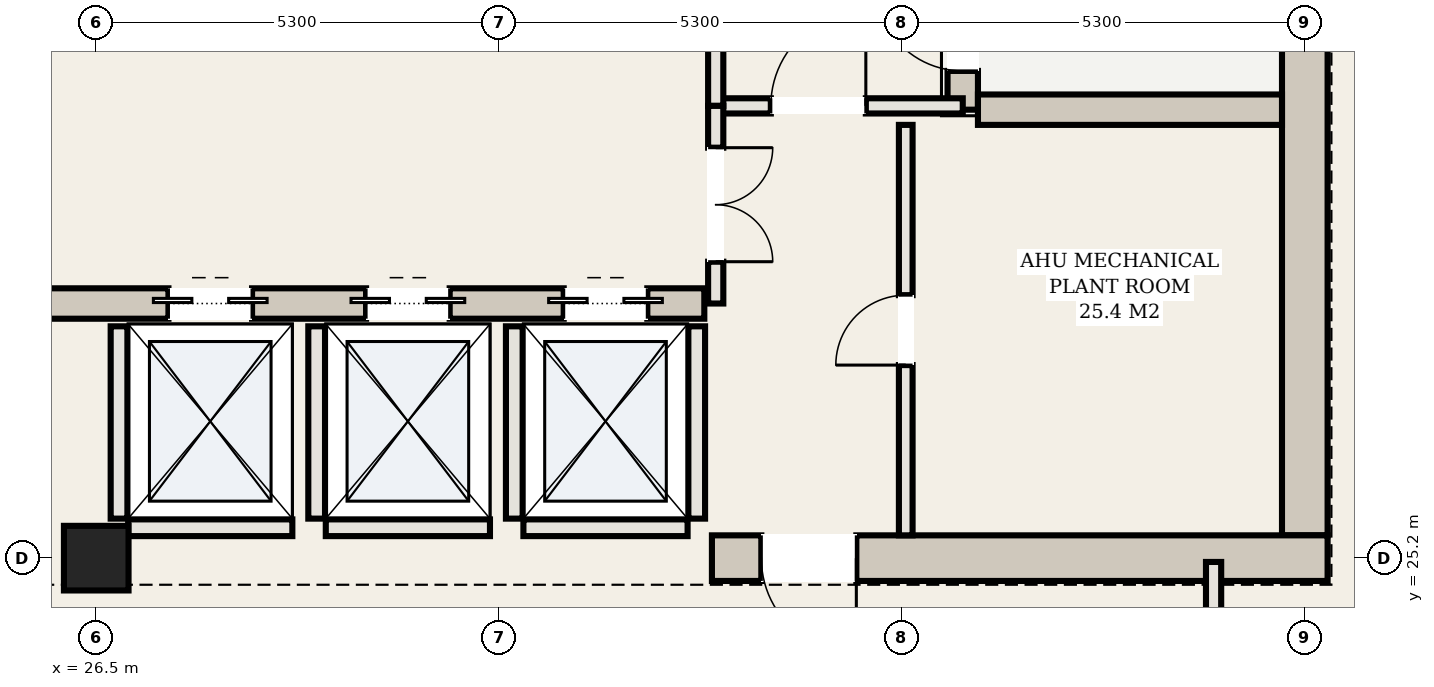
"""IFC4 building model, lengths in metres.
Left out: names, types, materials, properties, quantities, classifications, styles, units other than length and angle.
Written with IfcOpenShell. Run it as: python <this file> out.ifc"""

import sys

from ifc_helpers import new_model, si_unit, direction, frame, frame_2d, origin, origin_2d, place, context, subcontext, project, spatial, rectangle, hollow_rectangle, extrude, element, fill, save


model = new_model("IFC4")
c1 = context("Model", 3, precision=1e-05, world=origin(), true_north=direction((0.0, 1.0)))
c2 = subcontext(c1, "Body", "Model", "MODEL_VIEW")
j1 = project(units=[si_unit("LENGTHUNIT", "METRE"), si_unit("PLANEANGLEUNIT", "RADIAN")], contexts=[c1])
p1 = place(None, origin())
s1 = spatial("IfcSite", under=j1, at=p1, CompositionType="ELEMENT")
p2 = place(p1, origin())
s2 = spatial("IfcBuilding", under=s1, at=p2, CompositionType="ELEMENT")
p3 = place(p2, frame((0.0, 0.0, 185.4)))
s3 = spatial("IfcBuildingStorey", under=s2, at=p3, CompositionType="ELEMENT", Elevation=185.4)
p4 = place(p3, frame((42.4, 25.5, 0.0), z_axis=(0.0, 0.0, 1.0), x_axis=(0.0, 1.0, 0.0)))
e1 = element("IfcWall", 1, at=p4, inside=s3, PredefinedType="SHEAR", context=c2, shape_type="SweptSolid", body=[
    extrude(rectangle(XDim=14.2, YDim=0.6, at=frame_2d((7.1, 0.0))), origin(), (0.0, 0.0, 1.0), 6.56),
])
p5 = place(p3, frame((34.6, 25.2, 0.0), z_axis=(0.0, 0.0, 1.0), x_axis=(1.0, 0.0, 0.0)))
e2 = element("IfcWall", 2, at=p5, inside=s3, PredefinedType="SHEAR", context=c2, shape_type="SweptSolid", body=[
    extrude(rectangle(XDim=8.1, YDim=0.6, at=frame_2d((4.05, 0.0))), origin(), (0.0, 0.0, 1.0), 6.56),
])
p6 = place(p5, frame((0.65, 0.0, 0.0)))
e3 = element("IfcOpeningElement", 3, at=p6, cuts=e2, PredefinedType="OPENING", context=c2, shape_type="SweptSolid", body=[
    extrude(rectangle(XDim=1.25, YDim=2.2, at=frame_2d((0.625, 1.1))), frame((0.0, 0.31, 0.0), z_axis=(0.0, -1.0, 0.0), x_axis=(1.0, 0.0, 0.0)), (0.0, 0.0, 1.0), 0.62),
])
p7 = place(p3, frame((37.9, 31.1, 0.0), z_axis=(0.0, 0.0, 1.0), x_axis=(0.0, 1.0, 0.0)))
e4 = element("IfcWall", 4, at=p7, inside=s3, PredefinedType="SHEAR", context=c2, shape_type="SweptSolid", body=[
    extrude(rectangle(XDim=8.6, YDim=0.4, at=frame_2d((4.3, 0.0))), origin(), (0.0, 0.0, 1.0), 6.56),
])
p8 = place(p7, frame((0.51, 0.0, 0.0)))
e5 = element("IfcOpeningElement", 5, at=p8, cuts=e4, PredefinedType="OPENING", context=c2, shape_type="SweptSolid", body=[
    extrude(rectangle(XDim=1.15, YDim=2.2, at=frame_2d((0.575, 1.1))), frame((0.0, 0.21, 0.0), z_axis=(0.0, -1.0, 0.0), x_axis=(1.0, 0.0, 0.0)), (0.0, 0.0, 1.0), 0.42),
])
p9 = place(p3, frame((38.1, 31.1, 0.0), z_axis=(0.0, 0.0, 1.0), x_axis=(1.0, 0.0, 0.0)))
e6 = element("IfcWall", 6, at=p9, inside=s3, PredefinedType="SHEAR", context=c2, shape_type="SweptSolid", body=[
    extrude(rectangle(XDim=4.0, YDim=0.4, at=frame_2d((2.0, 0.0))), origin(), (0.0, 0.0, 1.0), 6.56),
])
p10 = place(p3, frame((18.5, 28.55, 0.0), z_axis=(0.0, 0.0, 1.0), x_axis=(1.0, 0.0, 0.0)))
e7 = element("IfcWall", 7, at=p10, inside=s3, PredefinedType="SHEAR", context=c2, shape_type="SweptSolid", body=[
    extrude(rectangle(XDim=16.0, YDim=0.4, at=frame_2d((8.0, 0.0))), origin(), (0.0, 0.0, 1.0), 6.56),
])
p11 = place(p10, frame((8.95, 0.0, 0.0)))
e8 = element("IfcOpeningElement", 8, at=p11, cuts=e7, PredefinedType="OPENING", context=c2, shape_type="SweptSolid", body=[
    extrude(rectangle(XDim=1.1, YDim=2.15, at=frame_2d((0.55, 1.075))), frame((0.0, 0.21, 0.0), z_axis=(0.0, -1.0, 0.0), x_axis=(1.0, 0.0, 0.0)), (0.0, 0.0, 1.0), 0.42),
])
p12 = place(p10, frame((11.55, 0.0, 0.0)))
e9 = element("IfcOpeningElement", 9, at=p12, cuts=e7, PredefinedType="OPENING", context=c2, shape_type="SweptSolid", body=[
    extrude(rectangle(XDim=1.1, YDim=2.15, at=frame_2d((0.55, 1.075))), frame((0.0, 0.21, 0.0), z_axis=(0.0, -1.0, 0.0), x_axis=(1.0, 0.0, 0.0)), (0.0, 0.0, 1.0), 0.42),
])
p13 = place(p10, frame((14.15, 0.0, 0.0)))
e10 = element("IfcOpeningElement", 10, at=p13, cuts=e7, PredefinedType="OPENING", context=c2, shape_type="SweptSolid", body=[
    extrude(rectangle(XDim=1.1, YDim=2.15, at=frame_2d((0.55, 1.075))), frame((0.0, 0.21, 0.0), z_axis=(0.0, -1.0, 0.0), x_axis=(1.0, 0.0, 0.0)), (0.0, 0.0, 1.0), 0.42),
])
p14 = place(p3, frame((26.5, 25.2, 0.0), z_axis=(0.0, 0.0, 1.0), x_axis=(1.0, 0.0, 0.0)))
e11 = element("IfcColumn", 11, at=p14, inside=s3, PredefinedType="COLUMN", context=c2, shape_type="SweptSolid", body=[
    extrude(hollow_rectangle(XDim=0.85, YDim=0.85, WallThickness=0.028, at=origin_2d()), origin(), (0.0, 0.0, 1.0), 6.8),
])
p15 = place(p3, frame((26.8, 25.72, 0.0), z_axis=(0.0, 0.0, 1.0), x_axis=(0.0, 1.0, 0.0)))
e12 = element("IfcWall", 12, at=p15, inside=s3, PredefinedType="SOLIDWALL", context=c2, shape_type="SweptSolid", body=[
    extrude(rectangle(XDim=2.53, YDim=0.22, at=frame_2d((1.265, 0.0))), origin(), (0.0, 0.0, 1.0), 6.56),
])
p16 = place(p3, frame((26.92, 25.6, 0.0), z_axis=(0.0, 0.0, 1.0), x_axis=(1.0, 0.0, 0.0)))
e13 = element("IfcWall", 13, at=p16, inside=s3, PredefinedType="SOLIDWALL", context=c2, shape_type="SweptSolid", body=[
    extrude(rectangle(XDim=2.16, YDim=0.22, at=frame_2d((1.08, 0.0))), origin(), (0.0, 0.0, 1.0), 5.755),
])
p17 = place(p3, frame((29.4, 25.72, 0.0), z_axis=(0.0, 0.0, 1.0), x_axis=(0.0, 1.0, 0.0)))
e14 = element("IfcWall", 14, at=p17, inside=s3, PredefinedType="SOLIDWALL", context=c2, shape_type="SweptSolid", body=[
    extrude(rectangle(XDim=2.53, YDim=0.22, at=frame_2d((1.265, 0.0))), origin(), (0.0, 0.0, 1.0), 6.56),
])
p18 = place(p3, frame((29.52, 25.6, 0.0), z_axis=(0.0, 0.0, 1.0), x_axis=(1.0, 0.0, 0.0)))
e15 = element("IfcWall", 15, at=p18, inside=s3, PredefinedType="SOLIDWALL", context=c2, shape_type="SweptSolid", body=[
    extrude(rectangle(XDim=2.16, YDim=0.22, at=frame_2d((1.08, 0.0))), origin(), (0.0, 0.0, 1.0), 5.755),
])
for number, where, z_axis, x_axis in (
    (16, (32.0, 25.72, 0.0), (0.0, 0.0, 1.0), (0.0, 1.0, 0.0)),
    (17, (34.4, 25.72, 0.0), (0.0, 0.0, 1.0), (0.0, 1.0, 0.0)),
):
    element("IfcWall", number, at=place(p3, frame(where, z_axis=z_axis, x_axis=x_axis)), inside=s3, PredefinedType="SOLIDWALL", context=c2, shape_type="SweptSolid", body=[
        extrude(rectangle(XDim=2.53, YDim=0.22, at=frame_2d((1.265, 0.0))), origin(), (0.0, 0.0, 1.0), 6.56),
    ])
p19 = place(p3, frame((32.12, 25.6, 0.0), z_axis=(0.0, 0.0, 1.0), x_axis=(1.0, 0.0, 0.0)))
e18 = element("IfcWall", 18, at=p19, inside=s3, PredefinedType="SOLIDWALL", context=c2, shape_type="SweptSolid", body=[
    extrude(rectangle(XDim=2.16, YDim=0.22, at=frame_2d((1.08, 0.0))), origin(), (0.0, 0.0, 1.0), 5.755),
])
p20 = place(p3, frame((34.65, 31.15, 0.0), z_axis=(0.0, 0.0, 1.0), x_axis=(1.0, 0.0, 0.0)))
e19 = element("IfcWall", 19, at=p20, inside=s3, PredefinedType="PARTITIONING", context=c2, shape_type="SweptSolid", body=[
    extrude(rectangle(XDim=3.25, YDim=0.2, at=frame_2d((1.625, 0.0))), origin(), (0.0, 0.0, 1.0), 6.56),
])
p21 = place(p20, frame((0.725, 0.0, 0.0)))
e20 = element("IfcOpeningElement", 20, at=p21, cuts=e19, PredefinedType="OPENING", context=c2, shape_type="SweptSolid", body=[
    extrude(rectangle(XDim=1.25, YDim=2.2, at=frame_2d((0.625, 1.1))), frame((0.0, 0.11, 0.0), z_axis=(0.0, -1.0, 0.0), x_axis=(1.0, 0.0, 0.0)), (0.0, 0.0, 1.0), 0.22),
])
p22 = place(p3, frame((34.65, 31.15, 0.0), z_axis=(0.0, 0.0, 1.0), x_axis=(0.0, 1.0, 0.0)))
e21 = element("IfcWall", 21, at=p22, inside=s3, PredefinedType="PARTITIONING", context=c2, shape_type="SweptSolid", body=[
    extrude(rectangle(XDim=5.15, YDim=0.2, at=frame_2d((2.575, 0.0))), origin(), (0.0, 0.0, 1.0), 6.56),
])
p23 = place(p22, frame((1.875, 0.0, 0.0)))
e22 = element("IfcOpeningElement", 22, at=p23, cuts=e21, PredefinedType="OPENING", context=c2, shape_type="SweptSolid", body=[
    extrude(rectangle(XDim=1.25, YDim=2.2, at=frame_2d((0.625, 1.1))), frame((0.0, 0.11, 0.0), z_axis=(0.0, -1.0, 0.0), x_axis=(1.0, 0.0, 0.0)), (0.0, 0.0, 1.0), 0.22),
])
p24 = place(p3, frame((37.15, 25.5, 0.0), z_axis=(0.0, 0.0, 1.0), x_axis=(0.0, 1.0, 0.0)))
e23 = element("IfcWall", 23, at=p24, inside=s3, PredefinedType="PARTITIONING", context=c2, shape_type="SweptSolid", body=[
    extrude(rectangle(XDim=5.4, YDim=0.18, at=frame_2d((2.7, 0.0))), origin(), (0.0, 0.0, 1.0), 5.055),
])
p25 = place(p24, frame((2.24, 0.0, 0.0)))
e24 = element("IfcOpeningElement", 24, at=p25, cuts=e23, PredefinedType="OPENING", context=c2, shape_type="SweptSolid", body=[
    extrude(rectangle(XDim=0.92, YDim=2.15, at=frame_2d((0.46, 1.075))), frame((0.0, 0.1, 0.0), z_axis=(0.0, -1.0, 0.0), x_axis=(1.0, 0.0, 0.0)), (0.0, 0.0, 1.0), 0.2),
])
p26 = place(p3, frame((34.65, 28.55, 0.0), z_axis=(0.0, 0.0, 1.0), x_axis=(0.0, 1.0, 0.0)))
e25 = element("IfcWall", 25, at=p26, inside=s3, PredefinedType="PARTITIONING", context=c2, shape_type="SweptSolid", body=[
    extrude(rectangle(XDim=2.6, YDim=0.2, at=frame_2d((1.3, 0.0))), origin(), (0.0, 0.0, 1.0), 6.56),
])
p27 = place(p26, frame((0.55, 0.0, 0.0)))
e26 = element("IfcOpeningElement", 26, at=p27, cuts=e25, PredefinedType="OPENING", context=c2, shape_type="SweptSolid", body=[
    extrude(rectangle(XDim=1.5, YDim=2.25, at=frame_2d((0.75, 1.125))), frame((0.0, 0.11, 0.0), z_axis=(0.0, -1.0, 0.0), x_axis=(1.0, 0.0, 0.0)), (0.0, 0.0, 1.0), 0.22),
])
p28 = place(p3, frame((41.2, 22.4, 0.0), z_axis=(0.0, 0.0, 1.0), x_axis=(0.0, 1.0, 0.0)))
e27 = element("IfcWall", 27, at=p28, inside=s3, PredefinedType="PARTITIONING", context=c2, shape_type="SweptSolid", body=[
    extrude(rectangle(XDim=2.75, YDim=0.2, at=frame_2d((1.375, 0.0))), origin(), (0.0, 0.0, 1.0), 6.56),
])
p29 = place(p11, origin())
e28 = element("IfcDoor", 28, at=p29, inside=s3, OperationType="DOUBLE_DOOR_SLIDING", PredefinedType="DOOR", context=c2, shape_type="SweptSolid", body=[
    extrude(rectangle(XDim=1.1, YDim=2.15, at=frame_2d((0.55, 1.075))), frame((0.0, 0.025, 0.0), z_axis=(0.0, -1.0, 0.0), x_axis=(1.0, 0.0, 0.0)), (0.0, 0.0, 1.0), 0.05),
])
fill(e8, e28)
p30 = place(p12, origin())
e29 = element("IfcDoor", 29, at=p30, inside=s3, OperationType="DOUBLE_DOOR_SLIDING", PredefinedType="DOOR", context=c2, shape_type="SweptSolid", body=[
    extrude(rectangle(XDim=1.1, YDim=2.15, at=frame_2d((0.55, 1.075))), frame((0.0, 0.025, 0.0), z_axis=(0.0, -1.0, 0.0), x_axis=(1.0, 0.0, 0.0)), (0.0, 0.0, 1.0), 0.05),
])
fill(e9, e29)
p31 = place(p13, origin())
e30 = element("IfcDoor", 30, at=p31, inside=s3, OperationType="DOUBLE_DOOR_SLIDING", PredefinedType="DOOR", context=c2, shape_type="SweptSolid", body=[
    extrude(rectangle(XDim=1.1, YDim=2.15, at=frame_2d((0.55, 1.075))), frame((0.0, 0.025, 0.0), z_axis=(0.0, -1.0, 0.0), x_axis=(1.0, 0.0, 0.0)), (0.0, 0.0, 1.0), 0.05),
])
fill(e10, e30)
p32 = place(p6, frame((1.25, 0.0, 0.0), z_axis=(0.0, 0.0, 1.0), x_axis=(-1.0, 0.0, 0.0)))
e31 = element("IfcDoor", 31, at=p32, inside=s3, OperationType="SINGLE_SWING_LEFT", PredefinedType="DOOR", context=c2, shape_type="SweptSolid", body=[
    extrude(rectangle(XDim=1.25, YDim=2.2, at=frame_2d((0.625, 1.1))), frame((0.0, 0.025, 0.0), z_axis=(0.0, -1.0, 0.0), x_axis=(1.0, 0.0, 0.0)), (0.0, 0.0, 1.0), 0.05),
])
fill(e3, e31)
p33 = place(p21, origin())
e32 = element("IfcDoor", 32, at=p33, inside=s3, OperationType="SINGLE_SWING_RIGHT", PredefinedType="DOOR", context=c2, shape_type="SweptSolid", body=[
    extrude(rectangle(XDim=1.25, YDim=2.2, at=frame_2d((0.625, 1.1))), frame((0.0, 0.025, 0.0), z_axis=(0.0, -1.0, 0.0), x_axis=(1.0, 0.0, 0.0)), (0.0, 0.0, 1.0), 0.05),
])
fill(e20, e32)
p34 = place(p8, origin())
e33 = element("IfcDoor", 33, at=p34, inside=s3, OperationType="SINGLE_SWING_RIGHT", PredefinedType="DOOR", context=c2, shape_type="SweptSolid", body=[
    extrude(rectangle(XDim=1.15, YDim=2.2, at=frame_2d((0.575, 1.1))), frame((0.0, 0.025, 0.0), z_axis=(0.0, -1.0, 0.0), x_axis=(1.0, 0.0, 0.0)), (0.0, 0.0, 1.0), 0.05),
])
fill(e5, e33)
p35 = place(p25, origin())
e34 = element("IfcDoor", 34, at=p35, inside=s3, OperationType="SINGLE_SWING_LEFT", PredefinedType="DOOR", context=c2, shape_type="SweptSolid", body=[
    extrude(rectangle(XDim=0.92, YDim=2.15, at=frame_2d((0.46, 1.075))), frame((0.0, 0.025, 0.0), z_axis=(0.0, -1.0, 0.0), x_axis=(1.0, 0.0, 0.0)), (0.0, 0.0, 1.0), 0.05),
])
fill(e24, e34)
p36 = place(p27, frame((1.5, 0.0, 0.0), z_axis=(0.0, 0.0, 1.0), x_axis=(-1.0, 0.0, 0.0)))
e35 = element("IfcDoor", 35, at=p36, inside=s3, OperationType="DOUBLE_DOOR_SINGLE_SWING", PredefinedType="DOOR", context=c2, shape_type="SweptSolid", body=[
    extrude(rectangle(XDim=1.5, YDim=2.25, at=frame_2d((0.75, 1.125))), frame((0.0, 0.025, 0.0), z_axis=(0.0, -1.0, 0.0), x_axis=(1.0, 0.0, 0.0)), (0.0, 0.0, 1.0), 0.05),
])
fill(e26, e35)
save(model, sys.argv[1])
